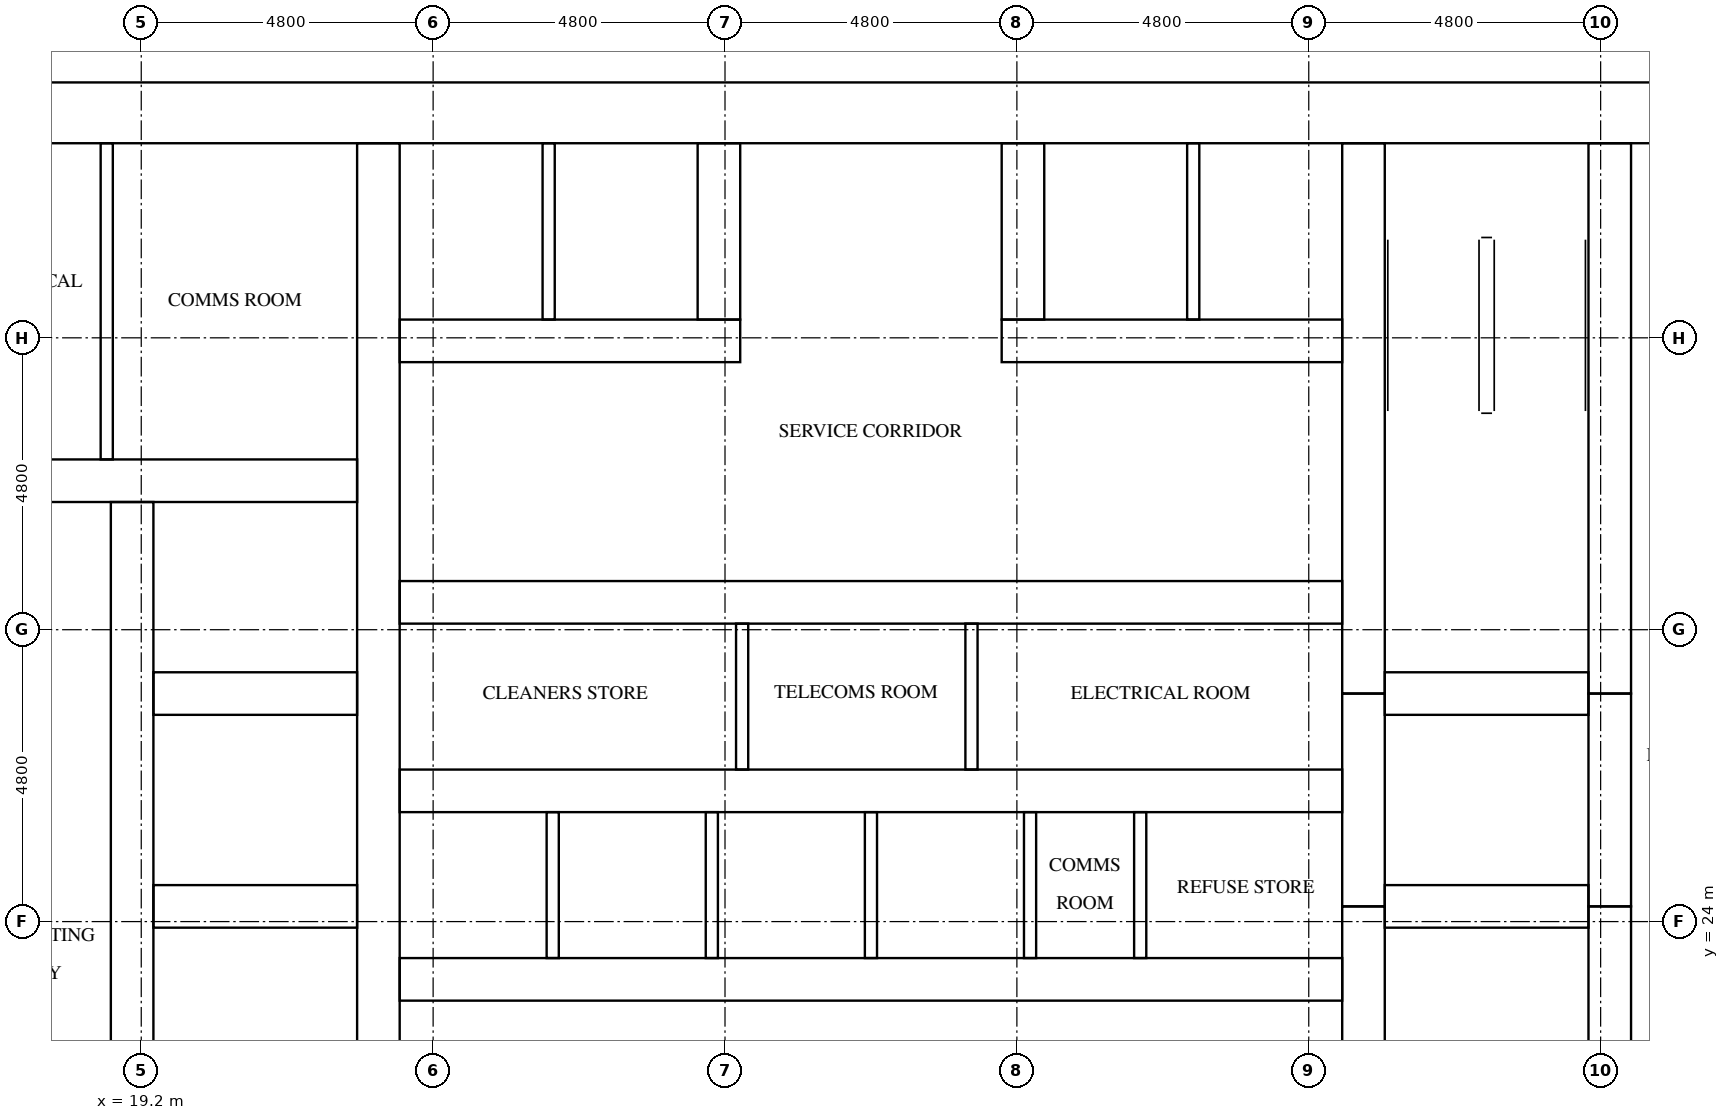
"""IFC4 building model, lengths in metres.
Left out: names, types, materials, properties, quantities, classifications, styles, units other than length and angle.
Written with IfcOpenShell. Run it as: python <this file> out.ifc"""

import sys

from ifc_helpers import new_model, si_unit, direction, frame, frame_2d, origin, place, context, subcontext, project, spatial, rectangle, extrude, element, fill, save


model = new_model("IFC4")
c1 = context("Model", 3, precision=1e-05, world=origin(), true_north=direction((0.0, 1.0)))
c2 = subcontext(c1, "Body", "Model", "MODEL_VIEW")
j1 = project(units=[si_unit("LENGTHUNIT", "METRE"), si_unit("PLANEANGLEUNIT", "RADIAN")], contexts=[c1])
p1 = place(None, origin())
s1 = spatial("IfcSite", under=j1, at=p1, CompositionType="ELEMENT")
p2 = place(p1, origin())
s2 = spatial("IfcBuilding", under=s1, at=p2, CompositionType="ELEMENT")
p3 = place(p2, frame((0.0, 0.0, 43.4)))
s3 = spatial("IfcBuildingStorey", under=s2, at=p3, CompositionType="ELEMENT", Elevation=43.4)
p4 = place(p3, frame((15.0, 37.3, 0.0), z_axis=(0.0, 0.0, 1.0), x_axis=(1.0, 0.0, 0.0)))
e1 = element("IfcWall", 1, at=p4, inside=s3, PredefinedType="SHEAR", context=c2, shape_type="SweptSolid", body=[
    extrude(rectangle(XDim=32.4, YDim=1.0, at=frame_2d((16.2, 0.0))), origin(), (0.0, 0.0, 1.0), 3.2),
])
p5 = place(p4, frame((15.3, 0.0, 0.0)))
e2 = element("IfcOpeningElement", 2, at=p5, cuts=e1, PredefinedType="OPENING", context=c2, shape_type="SweptSolid", body=[
    extrude(rectangle(XDim=1.8, YDim=2.1, at=frame_2d((0.9, 1.05))), frame((0.0, 0.51, 0.0), z_axis=(0.0, -1.0, 0.0), x_axis=(1.0, 0.0, 0.0)), (0.0, 0.0, 1.0), 1.02),
])
p6 = place(p4, frame((1.766, 0.0, 0.0)))
e3 = element("IfcOpeningElement", 3, at=p6, cuts=e1, PredefinedType="OPENING", context=c2, shape_type="SweptSolid", body=[
    extrude(rectangle(XDim=1.0, YDim=2.1, at=frame_2d((0.5, 1.05))), frame((0.0, 0.51, 0.0), z_axis=(0.0, -1.0, 0.0), x_axis=(1.0, 0.0, 0.0)), (0.0, 0.0, 1.0), 1.02),
])
p7 = place(p4, frame((5.241, 0.0, 0.0)))
e4 = element("IfcOpeningElement", 4, at=p7, cuts=e1, PredefinedType="OPENING", context=c2, shape_type="SweptSolid", body=[
    extrude(rectangle(XDim=1.0, YDim=2.1, at=frame_2d((0.5, 1.05))), frame((0.0, 0.51, 0.0), z_axis=(0.0, -1.0, 0.0), x_axis=(1.0, 0.0, 0.0)), (0.0, 0.0, 1.0), 1.02),
])
p8 = place(p3, frame((19.05, 16.0, 0.0), z_axis=(0.0, 0.0, 1.0), x_axis=(0.0, 1.0, 0.0)))
e5 = element("IfcWall", 5, at=p8, inside=s3, PredefinedType="SHEAR", context=c2, shape_type="SweptSolid", body=[
    extrude(rectangle(XDim=14.9, YDim=0.7, at=frame_2d((7.45, 0.0))), origin(), (0.0, 0.0, 1.0), 3.2),
])
p9 = place(p8, frame((9.45, 0.0, 0.0)))
e6 = element("IfcOpeningElement", 6, at=p9, cuts=e5, PredefinedType="OPENING", context=c2, shape_type="SweptSolid", body=[
    extrude(rectangle(XDim=1.1, YDim=2.1, at=frame_2d((0.55, 1.05))), frame((0.0, 0.36, 0.0), z_axis=(0.0, -1.0, 0.0), x_axis=(1.0, 0.0, 0.0)), (0.0, 0.0, 1.0), 0.72),
])
p10 = place(p8, frame((12.95, 0.0, 0.0)))
e7 = element("IfcOpeningElement", 7, at=p10, cuts=e5, PredefinedType="OPENING", context=c2, shape_type="SweptSolid", body=[
    extrude(rectangle(XDim=1.1, YDim=2.1, at=frame_2d((0.55, 1.05))), frame((0.0, 0.36, 0.0), z_axis=(0.0, -1.0, 0.0), x_axis=(1.0, 0.0, 0.0)), (0.0, 0.0, 1.0), 0.72),
])
p11 = place(p8, frame((0.2, 0.0, 0.0)))
e8 = element("IfcOpeningElement", 8, at=p11, cuts=e5, PredefinedType="OPENING", context=c2, shape_type="SweptSolid", body=[
    extrude(rectangle(XDim=1.2, YDim=2.1, at=frame_2d((0.6, 1.05))), frame((0.0, 0.36, 0.0), z_axis=(0.0, -1.0, 0.0), x_axis=(1.0, 0.0, 0.0)), (0.0, 0.0, 1.0), 0.72),
])
p12 = place(p3, frame((23.1, 16.0, 0.0), z_axis=(0.0, 0.0, 1.0), x_axis=(0.0, 1.0, 0.0)))
e9 = element("IfcWall", 9, at=p12, inside=s3, PredefinedType="SHEAR", context=c2, shape_type="SweptSolid", body=[
    extrude(rectangle(XDim=20.8, YDim=0.7, at=frame_2d((10.4, 0.0))), origin(), (0.0, 0.0, 1.0), 3.2),
])
p13 = place(p3, frame((39.3, 16.0, 0.0), z_axis=(0.0, 0.0, 1.0), x_axis=(0.0, 1.0, 0.0)))
e10 = element("IfcWall", 10, at=p13, inside=s3, PredefinedType="SHEAR", context=c2, shape_type="SweptSolid", body=[
    extrude(rectangle(XDim=8.25, YDim=0.7, at=frame_2d((4.125, 0.0))), origin(), (0.0, 0.0, 1.0), 3.2),
])
p14 = place(p3, frame((39.3, 24.25, 0.0), z_axis=(0.0, 0.0, 1.0), x_axis=(0.0, 1.0, 0.0)))
e11 = element("IfcWall", 11, at=p14, inside=s3, PredefinedType="SHEAR", context=c2, shape_type="SweptSolid", body=[
    extrude(rectangle(XDim=3.5, YDim=0.7, at=frame_2d((1.75, 0.0))), origin(), (0.0, 0.0, 1.0), 3.2),
])
p15 = place(p3, frame((39.3, 27.75, 0.0), z_axis=(0.0, 0.0, 1.0), x_axis=(0.0, 1.0, 0.0)))
e12 = element("IfcWall", 12, at=p15, inside=s3, PredefinedType="SHEAR", context=c2, shape_type="SweptSolid", body=[
    extrude(rectangle(XDim=9.05, YDim=0.7, at=frame_2d((4.525, 0.0))), origin(), (0.0, 0.0, 1.0), 3.2),
])
p16 = place(p3, frame((43.35, 16.0, 0.0), z_axis=(0.0, 0.0, 1.0), x_axis=(0.0, 1.0, 0.0)))
e13 = element("IfcWall", 13, at=p16, inside=s3, PredefinedType="SHEAR", context=c2, shape_type="SweptSolid", body=[
    extrude(rectangle(XDim=8.25, YDim=0.7, at=frame_2d((4.125, 0.0))), origin(), (0.0, 0.0, 1.0), 3.2),
])
p17 = place(p16, frame((0.2, 0.0, 0.0)))
e14 = element("IfcOpeningElement", 14, at=p17, cuts=e13, PredefinedType="OPENING", context=c2, shape_type="SweptSolid", body=[
    extrude(rectangle(XDim=1.2, YDim=2.1, at=frame_2d((0.6, 1.05))), frame((0.0, 0.36, 0.0), z_axis=(0.0, -1.0, 0.0), x_axis=(1.0, 0.0, 0.0)), (0.0, 0.0, 1.0), 0.72),
])
p18 = place(p3, frame((43.35, 24.25, 0.0), z_axis=(0.0, 0.0, 1.0), x_axis=(0.0, 1.0, 0.0)))
e15 = element("IfcWall", 15, at=p18, inside=s3, PredefinedType="SHEAR", context=c2, shape_type="SweptSolid", body=[
    extrude(rectangle(XDim=3.5, YDim=0.7, at=frame_2d((1.75, 0.0))), origin(), (0.0, 0.0, 1.0), 3.2),
])
p19 = place(p18, frame((1.2, 0.0, 0.0)))
e16 = element("IfcOpeningElement", 16, at=p19, cuts=e15, PredefinedType="OPENING", context=c2, shape_type="SweptSolid", body=[
    extrude(rectangle(XDim=1.1, YDim=2.1, at=frame_2d((0.55, 1.05))), frame((0.0, 0.36, 0.0), z_axis=(0.0, -1.0, 0.0), x_axis=(1.0, 0.0, 0.0)), (0.0, 0.0, 1.0), 0.72),
])
p20 = place(p3, frame((43.35, 27.75, 0.0), z_axis=(0.0, 0.0, 1.0), x_axis=(0.0, 1.0, 0.0)))
e17 = element("IfcWall", 17, at=p20, inside=s3, PredefinedType="SHEAR", context=c2, shape_type="SweptSolid", body=[
    extrude(rectangle(XDim=9.05, YDim=0.7, at=frame_2d((4.525, 0.0))), origin(), (0.0, 0.0, 1.0), 3.2),
])
p21 = place(p20, frame((7.65, 0.0, 0.0)))
e18 = element("IfcOpeningElement", 18, at=p21, cuts=e17, PredefinedType="OPENING", context=c2, shape_type="SweptSolid", body=[
    extrude(rectangle(XDim=1.2, YDim=2.1, at=frame_2d((0.6, 1.05))), frame((0.0, 0.36, 0.0), z_axis=(0.0, -1.0, 0.0), x_axis=(1.0, 0.0, 0.0)), (0.0, 0.0, 1.0), 0.72),
])
for number, where, z_axis, x_axis in (
    (19, (19.4, 24.25, 0.0), (0.0, 0.0, 1.0), (1.0, 0.0, 0.0)),
    (20, (19.4, 27.75, 0.0), (0.0, 0.0, 1.0), (1.0, 0.0, 0.0)),
):
    element("IfcWall", number, at=place(p3, frame(where, z_axis=z_axis, x_axis=x_axis)), inside=s3, PredefinedType="SHEAR", context=c2, shape_type="SweptSolid", body=[
        extrude(rectangle(XDim=3.35, YDim=0.7, at=frame_2d((1.675, 0.0))), origin(), (0.0, 0.0, 1.0), 3.2),
    ])
p22 = place(p3, frame((16.0, 31.25, 0.0), z_axis=(0.0, 0.0, 1.0), x_axis=(1.0, 0.0, 0.0)))
e21 = element("IfcWall", 21, at=p22, inside=s3, PredefinedType="SHEAR", context=c2, shape_type="SweptSolid", body=[
    extrude(rectangle(XDim=6.75, YDim=0.7, at=frame_2d((3.375, 0.0))), origin(), (0.0, 0.0, 1.0), 3.2),
])
for number, where, z_axis, x_axis in (
    (22, (39.65, 24.25, 0.0), (0.0, 0.0, 1.0), (1.0, 0.0, 0.0)),
    (23, (39.65, 27.75, 0.0), (0.0, 0.0, 1.0), (1.0, 0.0, 0.0)),
):
    element("IfcWall", number, at=place(p3, frame(where, z_axis=z_axis, x_axis=x_axis)), inside=s3, PredefinedType="SHEAR", context=c2, shape_type="SweptSolid", body=[
        extrude(rectangle(XDim=3.35, YDim=0.7, at=frame_2d((1.675, 0.0))), origin(), (0.0, 0.0, 1.0), 3.2),
    ])
p23 = place(p3, frame((23.45, 23.05, 0.0), z_axis=(0.0, 0.0, 1.0), x_axis=(1.0, 0.0, 0.0)))
e24 = element("IfcWall", 24, at=p23, inside=s3, PredefinedType="SHEAR", context=c2, shape_type="SweptSolid", body=[
    extrude(rectangle(XDim=15.5, YDim=0.7, at=frame_2d((7.75, 0.0))), origin(), (0.0, 0.0, 1.0), 3.2),
])
p24 = place(p23, frame((0.658, 0.0, 0.0)))
e25 = element("IfcOpeningElement", 25, at=p24, cuts=e24, PredefinedType="OPENING", context=c2, shape_type="SweptSolid", body=[
    extrude(rectangle(XDim=1.1, YDim=2.1, at=frame_2d((0.55, 1.05))), frame((0.0, 0.36, 0.0), z_axis=(0.0, -1.0, 0.0), x_axis=(1.0, 0.0, 0.0)), (0.0, 0.0, 1.0), 0.72),
])
p25 = place(p23, frame((3.275, 0.0, 0.0)))
e26 = element("IfcOpeningElement", 26, at=p25, cuts=e24, PredefinedType="OPENING", context=c2, shape_type="SweptSolid", body=[
    extrude(rectangle(XDim=1.1, YDim=2.1, at=frame_2d((0.55, 1.05))), frame((0.0, 0.36, 0.0), z_axis=(0.0, -1.0, 0.0), x_axis=(1.0, 0.0, 0.0)), (0.0, 0.0, 1.0), 0.72),
])
p26 = place(p23, frame((10.772, 0.0, 0.0)))
e27 = element("IfcOpeningElement", 27, at=p26, cuts=e24, PredefinedType="OPENING", context=c2, shape_type="SweptSolid", body=[
    extrude(rectangle(XDim=1.0, YDim=2.1, at=frame_2d((0.5, 1.05))), frame((0.0, 0.36, 0.0), z_axis=(0.0, -1.0, 0.0), x_axis=(1.0, 0.0, 0.0)), (0.0, 0.0, 1.0), 0.72),
])
p27 = place(p23, frame((13.389, 0.0, 0.0)))
e28 = element("IfcOpeningElement", 28, at=p27, cuts=e24, PredefinedType="OPENING", context=c2, shape_type="SweptSolid", body=[
    extrude(rectangle(XDim=1.0, YDim=2.1, at=frame_2d((0.5, 1.05))), frame((0.0, 0.36, 0.0), z_axis=(0.0, -1.0, 0.0), x_axis=(1.0, 0.0, 0.0)), (0.0, 0.0, 1.0), 0.72),
])
p28 = place(p3, frame((23.45, 26.15, 0.0), z_axis=(0.0, 0.0, 1.0), x_axis=(1.0, 0.0, 0.0)))
e29 = element("IfcWall", 29, at=p28, inside=s3, PredefinedType="SHEAR", context=c2, shape_type="SweptSolid", body=[
    extrude(rectangle(XDim=15.5, YDim=0.7, at=frame_2d((7.75, 0.0))), origin(), (0.0, 0.0, 1.0), 3.2),
])
p29 = place(p3, frame((23.45, 29.25, 0.0), z_axis=(0.0, 0.0, 1.0), x_axis=(1.0, 0.0, 0.0)))
e30 = element("IfcWall", 30, at=p29, inside=s3, PredefinedType="SHEAR", context=c2, shape_type="SweptSolid", body=[
    extrude(rectangle(XDim=15.5, YDim=0.7, at=frame_2d((7.75, 0.0))), origin(), (0.0, 0.0, 1.0), 3.2),
])
p30 = place(p29, frame((2.266, 0.0, 0.0)))
e31 = element("IfcOpeningElement", 31, at=p30, cuts=e30, PredefinedType="OPENING", context=c2, shape_type="SweptSolid", body=[
    extrude(rectangle(XDim=1.0, YDim=2.1, at=frame_2d((0.5, 1.05))), frame((0.0, 0.36, 0.0), z_axis=(0.0, -1.0, 0.0), x_axis=(1.0, 0.0, 0.0)), (0.0, 0.0, 1.0), 0.72),
])
p31 = place(p29, frame((7.018, 0.0, 0.0)))
e32 = element("IfcOpeningElement", 32, at=p31, cuts=e30, PredefinedType="OPENING", context=c2, shape_type="SweptSolid", body=[
    extrude(rectangle(XDim=1.0, YDim=2.1, at=frame_2d((0.5, 1.05))), frame((0.0, 0.36, 0.0), z_axis=(0.0, -1.0, 0.0), x_axis=(1.0, 0.0, 0.0)), (0.0, 0.0, 1.0), 0.72),
])
p32 = place(p29, frame((12.002, 0.0, 0.0)))
e33 = element("IfcOpeningElement", 33, at=p32, cuts=e30, PredefinedType="OPENING", context=c2, shape_type="SweptSolid", body=[
    extrude(rectangle(XDim=1.0, YDim=2.1, at=frame_2d((0.5, 1.05))), frame((0.0, 0.36, 0.0), z_axis=(0.0, -1.0, 0.0), x_axis=(1.0, 0.0, 0.0)), (0.0, 0.0, 1.0), 0.72),
])
p33 = place(p3, frame((23.45, 33.55, 0.0), z_axis=(0.0, 0.0, 1.0), x_axis=(1.0, 0.0, 0.0)))
e34 = element("IfcWall", 34, at=p33, inside=s3, PredefinedType="SHEAR", context=c2, shape_type="SweptSolid", body=[
    extrude(rectangle(XDim=5.6, YDim=0.7, at=frame_2d((2.8, 0.0))), origin(), (0.0, 0.0, 1.0), 3.2),
])
p34 = place(p3, frame((33.35, 33.55, 0.0), z_axis=(0.0, 0.0, 1.0), x_axis=(1.0, 0.0, 0.0)))
e35 = element("IfcWall", 35, at=p34, inside=s3, PredefinedType="SHEAR", context=c2, shape_type="SweptSolid", body=[
    extrude(rectangle(XDim=5.6, YDim=0.7, at=frame_2d((2.8, 0.0))), origin(), (0.0, 0.0, 1.0), 3.2),
])
for number, where, z_axis, x_axis in (
    (36, (28.7, 33.9, 0.0), (0.0, 0.0, 1.0), (0.0, 1.0, 0.0)),
    (37, (33.7, 33.9, 0.0), (0.0, 0.0, 1.0), (0.0, 1.0, 0.0)),
):
    element("IfcWall", number, at=place(p3, frame(where, z_axis=z_axis, x_axis=x_axis)), inside=s3, PredefinedType="SHEAR", context=c2, shape_type="SweptSolid", body=[
        extrude(rectangle(XDim=2.9, YDim=0.7, at=frame_2d((1.45, 0.0))), origin(), (0.0, 0.0, 1.0), 3.2),
    ])
for number, where, z_axis, x_axis in (
    (38, (25.967, 23.4, 0.0), (0.0, 0.0, 1.0), (0.0, 1.0, 0.0)),
    (39, (28.583, 23.4, 0.0), (0.0, 0.0, 1.0), (0.0, 1.0, 0.0)),
    (40, (31.2, 23.4, 0.0), (0.0, 0.0, 1.0), (0.0, 1.0, 0.0)),
    (41, (33.817, 23.4, 0.0), (0.0, 0.0, 1.0), (0.0, 1.0, 0.0)),
):
    element("IfcWall", number, at=place(p3, frame(where, z_axis=z_axis, x_axis=x_axis)), inside=s3, PredefinedType="SOLIDWALL", context=c2, shape_type="SweptSolid", body=[
        extrude(rectangle(XDim=2.4, YDim=0.2, at=frame_2d((1.2, 0.0))), origin(), (0.0, 0.0, 1.0), 3.2),
    ])
for number, where, z_axis, x_axis in (
    (42, (25.9, 33.9, 0.0), (0.0, 0.0, 1.0), (0.0, 1.0, 0.0)),
    (43, (36.5, 33.9, 0.0), (0.0, 0.0, 1.0), (0.0, 1.0, 0.0)),
):
    element("IfcWall", number, at=place(p3, frame(where, z_axis=z_axis, x_axis=x_axis)), inside=s3, PredefinedType="SOLIDWALL", context=c2, shape_type="SweptSolid", body=[
        extrude(rectangle(XDim=2.9, YDim=0.2, at=frame_2d((1.45, 0.0))), origin(), (0.0, 0.0, 1.0), 3.2),
    ])
p35 = place(p3, frame((18.633, 31.6, 0.0), z_axis=(0.0, 0.0, 1.0), x_axis=(0.0, 1.0, 0.0)))
e44 = element("IfcWall", 44, at=p35, inside=s3, PredefinedType="PARTITIONING", context=c2, shape_type="SweptSolid", body=[
    extrude(rectangle(XDim=5.2, YDim=0.2, at=frame_2d((2.6, 0.0))), origin(), (0.0, 0.0, 1.0), 3.2),
])
p36 = place(p3, frame((35.628, 23.4, 0.0), z_axis=(0.0, 0.0, 1.0), x_axis=(0.0, 1.0, 0.0)))
e45 = element("IfcWall", 45, at=p36, inside=s3, PredefinedType="PARTITIONING", context=c2, shape_type="SweptSolid", body=[
    extrude(rectangle(XDim=2.4, YDim=0.2, at=frame_2d((1.2, 0.0))), origin(), (0.0, 0.0, 1.0), 3.2),
])
for number, where, z_axis, x_axis in (
    (46, (29.082, 26.5, 0.0), (0.0, 0.0, 1.0), (0.0, 1.0, 0.0)),
    (47, (32.853, 26.5, 0.0), (0.0, 0.0, 1.0), (0.0, 1.0, 0.0)),
):
    element("IfcWall", number, at=place(p3, frame(where, z_axis=z_axis, x_axis=x_axis)), inside=s3, PredefinedType="PARTITIONING", context=c2, shape_type="SweptSolid", body=[
        extrude(rectangle(XDim=2.4, YDim=0.2, at=frame_2d((1.2, 0.0))), origin(), (0.0, 0.0, 1.0), 3.2),
    ])
p37 = place(p24, origin())
e48 = element("IfcDoor", 48, at=p37, inside=s3, OperationType="DOUBLE_DOOR_SLIDING", PredefinedType="DOOR", context=c2, shape_type="SweptSolid", body=[
    extrude(rectangle(XDim=1.1, YDim=2.1, at=frame_2d((0.55, 1.05))), frame((0.0, 0.025, 0.0), z_axis=(0.0, -1.0, 0.0), x_axis=(1.0, 0.0, 0.0)), (0.0, 0.0, 1.0), 0.05),
])
fill(e25, e48)
p38 = place(p25, origin())
e49 = element("IfcDoor", 49, at=p38, inside=s3, OperationType="DOUBLE_DOOR_SLIDING", PredefinedType="DOOR", context=c2, shape_type="SweptSolid", body=[
    extrude(rectangle(XDim=1.1, YDim=2.1, at=frame_2d((0.55, 1.05))), frame((0.0, 0.025, 0.0), z_axis=(0.0, -1.0, 0.0), x_axis=(1.0, 0.0, 0.0)), (0.0, 0.0, 1.0), 0.05),
])
fill(e26, e49)
p39 = place(p9, origin())
e50 = element("IfcDoor", 50, at=p39, inside=s3, OperationType="DOUBLE_DOOR_SLIDING", PredefinedType="DOOR", context=c2, shape_type="SweptSolid", body=[
    extrude(rectangle(XDim=1.1, YDim=2.1, at=frame_2d((0.55, 1.05))), frame((0.0, 0.025, 0.0), z_axis=(0.0, -1.0, 0.0), x_axis=(1.0, 0.0, 0.0)), (0.0, 0.0, 1.0), 0.05),
])
fill(e6, e50)
p40 = place(p10, origin())
e51 = element("IfcDoor", 51, at=p40, inside=s3, OperationType="DOUBLE_DOOR_SLIDING", PredefinedType="DOOR", context=c2, shape_type="SweptSolid", body=[
    extrude(rectangle(XDim=1.1, YDim=2.1, at=frame_2d((0.55, 1.05))), frame((0.0, 0.025, 0.0), z_axis=(0.0, -1.0, 0.0), x_axis=(1.0, 0.0, 0.0)), (0.0, 0.0, 1.0), 0.05),
])
fill(e7, e51)
p41 = place(p19, origin())
e52 = element("IfcDoor", 52, at=p41, inside=s3, OperationType="DOUBLE_DOOR_SLIDING", PredefinedType="DOOR", context=c2, shape_type="SweptSolid", body=[
    extrude(rectangle(XDim=1.1, YDim=2.1, at=frame_2d((0.55, 1.05))), frame((0.0, 0.025, 0.0), z_axis=(0.0, -1.0, 0.0), x_axis=(1.0, 0.0, 0.0)), (0.0, 0.0, 1.0), 0.05),
])
fill(e16, e52)
p42 = place(p21, origin())
e53 = element("IfcDoor", 53, at=p42, inside=s3, OperationType="SINGLE_SWING_RIGHT", PredefinedType="DOOR", context=c2, shape_type="SweptSolid", body=[
    extrude(rectangle(XDim=1.2, YDim=2.1, at=frame_2d((0.6, 1.05))), frame((0.0, 0.025, 0.0), z_axis=(0.0, -1.0, 0.0), x_axis=(1.0, 0.0, 0.0)), (0.0, 0.0, 1.0), 0.05),
])
fill(e18, e53)
p43 = place(p5, origin())
e54 = element("IfcDoor", 54, at=p43, inside=s3, OperationType="DOUBLE_DOOR_SINGLE_SWING", PredefinedType="DOOR", context=c2, shape_type="SweptSolid", body=[
    extrude(rectangle(XDim=1.8, YDim=2.1, at=frame_2d((0.9, 1.05))), frame((0.0, 0.025, 0.0), z_axis=(0.0, -1.0, 0.0), x_axis=(1.0, 0.0, 0.0)), (0.0, 0.0, 1.0), 0.05),
])
fill(e2, e54)
p44 = place(p6, origin())
e55 = element("IfcDoor", 55, at=p44, inside=s3, OperationType="SINGLE_SWING_LEFT", PredefinedType="DOOR", context=c2, shape_type="SweptSolid", body=[
    extrude(rectangle(XDim=1.0, YDim=2.1, at=frame_2d((0.5, 1.05))), frame((0.0, 0.025, 0.0), z_axis=(0.0, -1.0, 0.0), x_axis=(1.0, 0.0, 0.0)), (0.0, 0.0, 1.0), 0.05),
])
fill(e3, e55)
p45 = place(p7, origin())
e56 = element("IfcDoor", 56, at=p45, inside=s3, OperationType="SINGLE_SWING_RIGHT", PredefinedType="DOOR", context=c2, shape_type="SweptSolid", body=[
    extrude(rectangle(XDim=1.0, YDim=2.1, at=frame_2d((0.5, 1.05))), frame((0.0, 0.025, 0.0), z_axis=(0.0, -1.0, 0.0), x_axis=(1.0, 0.0, 0.0)), (0.0, 0.0, 1.0), 0.05),
])
fill(e4, e56)
p46 = place(p26, frame((1.0, 0.0, 0.0), z_axis=(0.0, 0.0, 1.0), x_axis=(-1.0, 0.0, 0.0)))
e57 = element("IfcDoor", 57, at=p46, inside=s3, OperationType="SINGLE_SWING_LEFT", PredefinedType="DOOR", context=c2, shape_type="SweptSolid", body=[
    extrude(rectangle(XDim=1.0, YDim=2.1, at=frame_2d((0.5, 1.05))), frame((0.0, 0.025, 0.0), z_axis=(0.0, -1.0, 0.0), x_axis=(1.0, 0.0, 0.0)), (0.0, 0.0, 1.0), 0.05),
])
fill(e27, e57)
p47 = place(p27, frame((1.0, 0.0, 0.0), z_axis=(0.0, 0.0, 1.0), x_axis=(-1.0, 0.0, 0.0)))
e58 = element("IfcDoor", 58, at=p47, inside=s3, OperationType="SINGLE_SWING_RIGHT", PredefinedType="DOOR", context=c2, shape_type="SweptSolid", body=[
    extrude(rectangle(XDim=1.0, YDim=2.1, at=frame_2d((0.5, 1.05))), frame((0.0, 0.025, 0.0), z_axis=(0.0, -1.0, 0.0), x_axis=(1.0, 0.0, 0.0)), (0.0, 0.0, 1.0), 0.05),
])
fill(e28, e58)
p48 = place(p30, origin())
e59 = element("IfcDoor", 59, at=p48, inside=s3, OperationType="SINGLE_SWING_LEFT", PredefinedType="DOOR", context=c2, shape_type="SweptSolid", body=[
    extrude(rectangle(XDim=1.0, YDim=2.1, at=frame_2d((0.5, 1.05))), frame((0.0, 0.025, 0.0), z_axis=(0.0, -1.0, 0.0), x_axis=(1.0, 0.0, 0.0)), (0.0, 0.0, 1.0), 0.05),
])
fill(e31, e59)
p49 = place(p31, origin())
e60 = element("IfcDoor", 60, at=p49, inside=s3, OperationType="SINGLE_SWING_RIGHT", PredefinedType="DOOR", context=c2, shape_type="SweptSolid", body=[
    extrude(rectangle(XDim=1.0, YDim=2.1, at=frame_2d((0.5, 1.05))), frame((0.0, 0.025, 0.0), z_axis=(0.0, -1.0, 0.0), x_axis=(1.0, 0.0, 0.0)), (0.0, 0.0, 1.0), 0.05),
])
fill(e32, e60)
p50 = place(p32, origin())
e61 = element("IfcDoor", 61, at=p50, inside=s3, OperationType="SINGLE_SWING_LEFT", PredefinedType="DOOR", context=c2, shape_type="SweptSolid", body=[
    extrude(rectangle(XDim=1.0, YDim=2.1, at=frame_2d((0.5, 1.05))), frame((0.0, 0.025, 0.0), z_axis=(0.0, -1.0, 0.0), x_axis=(1.0, 0.0, 0.0)), (0.0, 0.0, 1.0), 0.05),
])
fill(e33, e61)
save(model, sys.argv[1])
